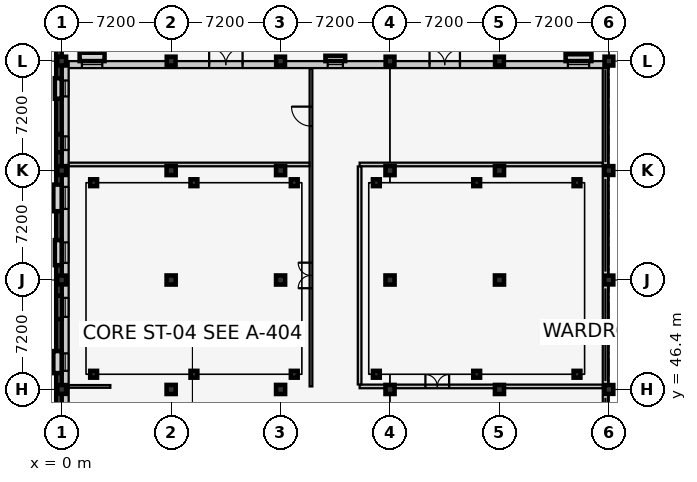
"""IFC4 building model, lengths in metres.
Left out: names, types, materials, properties, quantities, classifications, styles, units other than length and angle.
Written with IfcOpenShell. Run it as: python <this file> out.ifc"""

import sys

from ifc_helpers import new_model, si_unit, direction, frame, frame_2d, origin, origin_2d, place, context, subcontext, project, spatial, rectangle, extrude, element, fill, save


model = new_model("IFC4")
c1 = context("Model", 3, precision=1e-05, world=origin(), true_north=direction((0.0, 1.0)))
c2 = subcontext(c1, "Body", "Model", "MODEL_VIEW")
j1 = project(units=[si_unit("LENGTHUNIT", "METRE"), si_unit("PLANEANGLEUNIT", "RADIAN")], contexts=[c1])
p1 = place(None, origin())
s1 = spatial("IfcSite", under=j1, at=p1, CompositionType="ELEMENT")
p2 = place(p1, origin())
s2 = spatial("IfcBuilding", under=s1, at=p2, CompositionType="ELEMENT")
p3 = place(p2, origin())
s3 = spatial("IfcBuildingStorey", under=s2, at=p3, CompositionType="ELEMENT", Elevation=0.0)
for number, where, z_axis, x_axis in (
    (1, (0.0, 46.4, 0.0), (0.0, 0.0, 1.0), (1.0, 0.0, 0.0)),
    (2, (0.0, 53.6, 0.0), (0.0, 0.0, 1.0), (1.0, 0.0, 0.0)),
    (3, (0.0, 60.8, 0.0), (0.0, 0.0, 1.0), (1.0, 0.0, 0.0)),
    (4, (0.0, 68.0, 0.0), (0.0, 0.0, 1.0), (1.0, 0.0, 0.0)),
):
    element("IfcColumn", number, at=place(p3, frame(where, z_axis=z_axis, x_axis=x_axis)), inside=s3, PredefinedType="COLUMN", context=c2, shape_type="SweptSolid", body=[
        extrude(rectangle(XDim=0.58, YDim=0.58, at=origin_2d()), origin(), (0.0, 0.0, 1.0), 5.4),
    ])
for number, where, z_axis, x_axis in (
    (5, (7.2, 46.4, 0.0), (0.0, 0.0, 1.0), (1.0, 0.0, 0.0)),
    (6, (7.2, 53.6, 0.0), (0.0, 0.0, 1.0), (1.0, 0.0, 0.0)),
    (7, (7.2, 60.8, 0.0), (0.0, 0.0, 1.0), (1.0, 0.0, 0.0)),
):
    element("IfcColumn", number, at=place(p3, frame(where, z_axis=z_axis, x_axis=x_axis)), inside=s3, PredefinedType="COLUMN", context=c2, shape_type="SweptSolid", body=[
        extrude(rectangle(XDim=0.6, YDim=0.6, at=origin_2d()), origin(), (0.0, 0.0, 1.0), 5.4),
    ])
p4 = place(p3, frame((7.2, 68.0, 0.0), z_axis=(0.0, 0.0, 1.0), x_axis=(1.0, 0.0, 0.0)))
e8 = element("IfcColumn", 8, at=p4, inside=s3, PredefinedType="COLUMN", context=c2, shape_type="SweptSolid", body=[
    extrude(rectangle(XDim=0.58, YDim=0.58, at=origin_2d()), origin(), (0.0, 0.0, 1.0), 5.4),
])
for number, where, z_axis, x_axis in (
    (9, (14.4, 46.4, 0.0), (0.0, 0.0, 1.0), (1.0, 0.0, 0.0)),
    (10, (14.4, 53.6, 0.0), (0.0, 0.0, 1.0), (1.0, 0.0, 0.0)),
    (11, (14.4, 60.8, 0.0), (0.0, 0.0, 1.0), (1.0, 0.0, 0.0)),
):
    element("IfcColumn", number, at=place(p3, frame(where, z_axis=z_axis, x_axis=x_axis)), inside=s3, PredefinedType="COLUMN", context=c2, shape_type="SweptSolid", body=[
        extrude(rectangle(XDim=0.6, YDim=0.6, at=origin_2d()), origin(), (0.0, 0.0, 1.0), 5.4),
    ])
p5 = place(p3, frame((14.4, 68.0, 0.0), z_axis=(0.0, 0.0, 1.0), x_axis=(1.0, 0.0, 0.0)))
e12 = element("IfcColumn", 12, at=p5, inside=s3, PredefinedType="COLUMN", context=c2, shape_type="SweptSolid", body=[
    extrude(rectangle(XDim=0.58, YDim=0.58, at=origin_2d()), origin(), (0.0, 0.0, 1.0), 5.4),
])
for number, where, z_axis, x_axis in (
    (13, (21.6, 46.4, 0.0), (0.0, 0.0, 1.0), (1.0, 0.0, 0.0)),
    (14, (21.6, 53.6, 0.0), (0.0, 0.0, 1.0), (1.0, 0.0, 0.0)),
    (15, (21.6, 60.8, 0.0), (0.0, 0.0, 1.0), (1.0, 0.0, 0.0)),
):
    element("IfcColumn", number, at=place(p3, frame(where, z_axis=z_axis, x_axis=x_axis)), inside=s3, PredefinedType="COLUMN", context=c2, shape_type="SweptSolid", body=[
        extrude(rectangle(XDim=0.6, YDim=0.6, at=origin_2d()), origin(), (0.0, 0.0, 1.0), 5.4),
    ])
p6 = place(p3, frame((21.6, 68.0, 0.0), z_axis=(0.0, 0.0, 1.0), x_axis=(1.0, 0.0, 0.0)))
e16 = element("IfcColumn", 16, at=p6, inside=s3, PredefinedType="COLUMN", context=c2, shape_type="SweptSolid", body=[
    extrude(rectangle(XDim=0.58, YDim=0.58, at=origin_2d()), origin(), (0.0, 0.0, 1.0), 5.4),
])
for number, where, z_axis, x_axis in (
    (17, (28.8, 46.4, 0.0), (0.0, 0.0, 1.0), (1.0, 0.0, 0.0)),
    (18, (28.8, 53.6, 0.0), (0.0, 0.0, 1.0), (1.0, 0.0, 0.0)),
    (19, (28.8, 60.8, 0.0), (0.0, 0.0, 1.0), (1.0, 0.0, 0.0)),
):
    element("IfcColumn", number, at=place(p3, frame(where, z_axis=z_axis, x_axis=x_axis)), inside=s3, PredefinedType="COLUMN", context=c2, shape_type="SweptSolid", body=[
        extrude(rectangle(XDim=0.6, YDim=0.6, at=origin_2d()), origin(), (0.0, 0.0, 1.0), 5.4),
    ])
for number, where, z_axis, x_axis in (
    (20, (28.8, 68.0, 0.0), (0.0, 0.0, 1.0), (1.0, 0.0, 0.0)),
    (21, (36.0, 46.4, 0.0), (0.0, 0.0, 1.0), (1.0, 0.0, 0.0)),
    (22, (36.0, 53.6, 0.0), (0.0, 0.0, 1.0), (1.0, 0.0, 0.0)),
    (23, (36.0, 60.8, 0.0), (0.0, 0.0, 1.0), (1.0, 0.0, 0.0)),
    (24, (36.0, 68.0, 0.0), (0.0, 0.0, 1.0), (1.0, 0.0, 0.0)),
):
    element("IfcColumn", number, at=place(p3, frame(where, z_axis=z_axis, x_axis=x_axis)), inside=s3, PredefinedType="COLUMN", context=c2, shape_type="SweptSolid", body=[
        extrude(rectangle(XDim=0.58, YDim=0.58, at=origin_2d()), origin(), (0.0, 0.0, 1.0), 5.4),
    ])
p7 = place(p3, frame((2.1, 47.4, -0.55), z_axis=(0.0, 0.0, 1.0), x_axis=(1.0, 0.0, 0.0)))
e25 = element("IfcColumn", 25, at=p7, inside=s3, PredefinedType="COLUMN", context=c2, shape_type="SweptSolid", body=[
    extrude(rectangle(XDim=0.45, YDim=0.45, at=origin_2d()), origin(), (0.0, 0.0, 1.0), 0.955),
])
p8 = place(p3, frame((2.1, 60.0, -0.55), z_axis=(0.0, 0.0, 1.0), x_axis=(1.0, 0.0, 0.0)))
e26 = element("IfcColumn", 26, at=p8, inside=s3, PredefinedType="COLUMN", context=c2, shape_type="SweptSolid", body=[
    extrude(rectangle(XDim=0.45, YDim=0.45, at=origin_2d()), origin(), (0.0, 0.0, 1.0), 3.625),
])
p9 = place(p3, frame((8.7, 47.4, -0.55), z_axis=(0.0, 0.0, 1.0), x_axis=(1.0, 0.0, 0.0)))
e27 = element("IfcColumn", 27, at=p9, inside=s3, PredefinedType="COLUMN", context=c2, shape_type="SweptSolid", body=[
    extrude(rectangle(XDim=0.45, YDim=0.45, at=origin_2d()), origin(), (0.0, 0.0, 1.0), 0.955),
])
p10 = place(p3, frame((8.7, 60.0, -0.55), z_axis=(0.0, 0.0, 1.0), x_axis=(1.0, 0.0, 0.0)))
e28 = element("IfcColumn", 28, at=p10, inside=s3, PredefinedType="COLUMN", context=c2, shape_type="SweptSolid", body=[
    extrude(rectangle(XDim=0.45, YDim=0.45, at=origin_2d()), origin(), (0.0, 0.0, 1.0), 3.625),
])
p11 = place(p3, frame((15.3, 47.4, -0.55), z_axis=(0.0, 0.0, 1.0), x_axis=(1.0, 0.0, 0.0)))
e29 = element("IfcColumn", 29, at=p11, inside=s3, PredefinedType="COLUMN", context=c2, shape_type="SweptSolid", body=[
    extrude(rectangle(XDim=0.45, YDim=0.45, at=origin_2d()), origin(), (0.0, 0.0, 1.0), 0.955),
])
p12 = place(p3, frame((15.3, 60.0, -0.55), z_axis=(0.0, 0.0, 1.0), x_axis=(1.0, 0.0, 0.0)))
e30 = element("IfcColumn", 30, at=p12, inside=s3, PredefinedType="COLUMN", context=c2, shape_type="SweptSolid", body=[
    extrude(rectangle(XDim=0.45, YDim=0.45, at=origin_2d()), origin(), (0.0, 0.0, 1.0), 3.625),
])
p13 = place(p3, frame((20.7, 47.4, -0.55), z_axis=(0.0, 0.0, 1.0), x_axis=(1.0, 0.0, 0.0)))
e31 = element("IfcColumn", 31, at=p13, inside=s3, PredefinedType="COLUMN", context=c2, shape_type="SweptSolid", body=[
    extrude(rectangle(XDim=0.45, YDim=0.45, at=origin_2d()), origin(), (0.0, 0.0, 1.0), 0.975),
])
p14 = place(p3, frame((20.7, 60.0, -0.55), z_axis=(0.0, 0.0, 1.0), x_axis=(1.0, 0.0, 0.0)))
e32 = element("IfcColumn", 32, at=p14, inside=s3, PredefinedType="COLUMN", context=c2, shape_type="SweptSolid", body=[
    extrude(rectangle(XDim=0.45, YDim=0.45, at=origin_2d()), origin(), (0.0, 0.0, 1.0), 3.645),
])
p15 = place(p3, frame((27.3, 47.4, -0.55), z_axis=(0.0, 0.0, 1.0), x_axis=(1.0, 0.0, 0.0)))
e33 = element("IfcColumn", 33, at=p15, inside=s3, PredefinedType="COLUMN", context=c2, shape_type="SweptSolid", body=[
    extrude(rectangle(XDim=0.45, YDim=0.45, at=origin_2d()), origin(), (0.0, 0.0, 1.0), 0.975),
])
p16 = place(p3, frame((27.3, 60.0, -0.55), z_axis=(0.0, 0.0, 1.0), x_axis=(1.0, 0.0, 0.0)))
e34 = element("IfcColumn", 34, at=p16, inside=s3, PredefinedType="COLUMN", context=c2, shape_type="SweptSolid", body=[
    extrude(rectangle(XDim=0.45, YDim=0.45, at=origin_2d()), origin(), (0.0, 0.0, 1.0), 3.645),
])
p17 = place(p3, frame((33.9, 47.4, -0.55), z_axis=(0.0, 0.0, 1.0), x_axis=(1.0, 0.0, 0.0)))
e35 = element("IfcColumn", 35, at=p17, inside=s3, PredefinedType="COLUMN", context=c2, shape_type="SweptSolid", body=[
    extrude(rectangle(XDim=0.45, YDim=0.45, at=origin_2d()), origin(), (0.0, 0.0, 1.0), 0.975),
])
p18 = place(p3, frame((33.9, 60.0, -0.55), z_axis=(0.0, 0.0, 1.0), x_axis=(1.0, 0.0, 0.0)))
e36 = element("IfcColumn", 36, at=p18, inside=s3, PredefinedType="COLUMN", context=c2, shape_type="SweptSolid", body=[
    extrude(rectangle(XDim=0.45, YDim=0.45, at=origin_2d()), origin(), (0.0, 0.0, 1.0), 3.645),
])
p19 = place(p3, frame((35.77, 68.0, 0.0), z_axis=(0.0, 0.0, 1.0), x_axis=(0.0, -1.0, 0.0)))
e37 = element("IfcWall", 37, at=p19, inside=s3, PredefinedType="SOLIDWALL", context=c2, shape_type="SweptSolid", body=[
    extrude(rectangle(XDim=28.8, YDim=0.35, at=frame_2d((14.4, 0.0))), origin(), (0.0, 0.0, 1.0), 0.85),
])
p20 = place(p3, frame((0.0, 67.77, 0.0), z_axis=(0.0, 0.0, 1.0), x_axis=(1.0, 0.0, 0.0)))
e38 = element("IfcWall", 38, at=p20, inside=s3, PredefinedType="SOLIDWALL", context=c2, shape_type="SweptSolid", body=[
    extrude(rectangle(XDim=36.0, YDim=0.46, at=frame_2d((18.0, 0.0))), origin(), (0.0, 0.0, 1.0), 4.435),
])
p21 = place(p20, frame((9.7, 0.0, 0.0)))
e39 = element("IfcOpeningElement", 39, at=p21, cuts=e38, PredefinedType="OPENING", context=c2, shape_type="SweptSolid", body=[
    extrude(rectangle(XDim=2.2, YDim=2.4, at=frame_2d((1.1, 1.2))), frame((0.0, 0.242, 0.0), z_axis=(0.0, -1.0, 0.0), x_axis=(1.0, 0.0, 0.0)), (0.0, 0.0, 1.0), 0.484),
])
p22 = place(p20, frame((24.2, 0.0, 0.0)))
e40 = element("IfcOpeningElement", 40, at=p22, cuts=e38, PredefinedType="OPENING", context=c2, shape_type="SweptSolid", body=[
    extrude(rectangle(XDim=2.0, YDim=2.35, at=frame_2d((1.0, 1.175))), frame((0.0, 0.242, 0.0), z_axis=(0.0, -1.0, 0.0), x_axis=(1.0, 0.0, 0.0)), (0.0, 0.0, 1.0), 0.484),
])
p23 = place(p20, frame((1.33, 0.0, 0.9)))
e41 = element("IfcOpeningElement", 41, at=p23, cuts=e38, PredefinedType="OPENING", context=c2, shape_type="SweptSolid", body=[
    extrude(rectangle(XDim=1.34, YDim=1.75, at=frame_2d((0.67, 0.875))), frame((0.0, 0.242, 0.0), z_axis=(0.0, -1.0, 0.0), x_axis=(1.0, 0.0, 0.0)), (0.0, 0.0, 1.0), 0.484),
])
p24 = place(p20, frame((17.5, 0.0, 0.9)))
e42 = element("IfcOpeningElement", 42, at=p24, cuts=e38, PredefinedType="OPENING", context=c2, shape_type="SweptSolid", body=[
    extrude(rectangle(XDim=1.0, YDim=1.35, at=frame_2d((0.5, 0.675))), frame((0.0, 0.242, 0.0), z_axis=(0.0, -1.0, 0.0), x_axis=(1.0, 0.0, 0.0)), (0.0, 0.0, 1.0), 0.484),
])
p25 = place(p20, frame((33.3, 0.0, 0.9)))
e43 = element("IfcOpeningElement", 43, at=p25, cuts=e38, PredefinedType="OPENING", context=c2, shape_type="SweptSolid", body=[
    extrude(rectangle(XDim=1.4, YDim=1.35, at=frame_2d((0.7, 0.675))), frame((0.0, 0.242, 0.0), z_axis=(0.0, -1.0, 0.0), x_axis=(1.0, 0.0, 0.0)), (0.0, 0.0, 1.0), 0.484),
])
p26 = place(p3, frame((0.23, 39.2, 0.0), z_axis=(0.0, 0.0, 1.0), x_axis=(0.0, 1.0, 0.0)))
e44 = element("IfcWall", 44, at=p26, inside=s3, PredefinedType="SOLIDWALL", context=c2, shape_type="SweptSolid", body=[
    extrude(rectangle(XDim=28.8, YDim=0.46, at=frame_2d((14.4, 0.0))), origin(), (0.0, 0.0, 1.0), 4.535),
])
p27 = place(p26, frame((2.7, 0.0, 0.0)))
e45 = element("IfcOpeningElement", 45, at=p27, cuts=e44, PredefinedType="OPENING", context=c2, shape_type="SweptSolid", body=[
    extrude(rectangle(XDim=1.8, YDim=2.3, at=frame_2d((0.9, 1.15))), frame((0.0, 0.242, 0.0), z_axis=(0.0, -1.0, 0.0), x_axis=(1.0, 0.0, 0.0)), (0.0, 0.0, 1.0), 0.484),
])
p28 = place(p26, frame((8.425, 0.0, 0.9)))
e46 = element("IfcOpeningElement", 46, at=p28, cuts=e44, PredefinedType="OPENING", context=c2, shape_type="SweptSolid", body=[
    extrude(rectangle(XDim=1.15, YDim=1.45, at=frame_2d((0.575, 0.725))), frame((0.0, 0.242, 0.0), z_axis=(0.0, -1.0, 0.0), x_axis=(1.0, 0.0, 0.0)), (0.0, 0.0, 1.0), 0.484),
])
p29 = place(p26, frame((11.975, 0.0, 0.9)))
e47 = element("IfcOpeningElement", 47, at=p29, cuts=e44, PredefinedType="OPENING", context=c2, shape_type="SweptSolid", body=[
    extrude(rectangle(XDim=1.25, YDim=1.45, at=frame_2d((0.625, 0.725))), frame((0.0, 0.242, 0.0), z_axis=(0.0, -1.0, 0.0), x_axis=(1.0, 0.0, 0.0)), (0.0, 0.0, 1.0), 0.484),
])
p30 = place(p26, frame((15.525, 0.0, 0.9)))
e48 = element("IfcOpeningElement", 48, at=p30, cuts=e44, PredefinedType="OPENING", context=c2, shape_type="SweptSolid", body=[
    extrude(rectangle(XDim=1.35, YDim=1.45, at=frame_2d((0.675, 0.725))), frame((0.0, 0.242, 0.0), z_axis=(0.0, -1.0, 0.0), x_axis=(1.0, 0.0, 0.0)), (0.0, 0.0, 1.0), 0.484),
])
p31 = place(p26, frame((19.075, 0.0, 0.9)))
e49 = element("IfcOpeningElement", 49, at=p31, cuts=e44, PredefinedType="OPENING", context=c2, shape_type="SweptSolid", body=[
    extrude(rectangle(XDim=1.45, YDim=1.45, at=frame_2d((0.725, 0.725))), frame((0.0, 0.242, 0.0), z_axis=(0.0, -1.0, 0.0), x_axis=(1.0, 0.0, 0.0)), (0.0, 0.0, 1.0), 0.484),
])
p32 = place(p26, frame((22.95, 0.0, 0.9)))
e50 = element("IfcOpeningElement", 50, at=p32, cuts=e44, PredefinedType="OPENING", context=c2, shape_type="SweptSolid", body=[
    extrude(rectangle(XDim=0.9, YDim=1.6, at=frame_2d((0.45, 0.8))), frame((0.0, 0.242, 0.0), z_axis=(0.0, -1.0, 0.0), x_axis=(1.0, 0.0, 0.0)), (0.0, 0.0, 1.0), 0.484),
])
p33 = place(p26, frame((26.475, 0.0, 0.9)))
e51 = element("IfcOpeningElement", 51, at=p33, cuts=e44, PredefinedType="OPENING", context=c2, shape_type="SweptSolid", body=[
    extrude(rectangle(XDim=1.05, YDim=1.6, at=frame_2d((0.525, 0.8))), frame((0.0, 0.242, 0.0), z_axis=(0.0, -1.0, 0.0), x_axis=(1.0, 0.0, 0.0)), (0.0, 0.0, 1.0), 0.484),
])
p34 = place(p3, frame((-0.18, 39.4, -0.8), z_axis=(0.0, 0.0, 1.0), x_axis=(0.0, 1.0, 0.0)))
e52 = element("IfcWall", 52, at=p34, inside=s3, PredefinedType="USERDEFINED", context=c2, shape_type="SweptSolid", body=[
    extrude(rectangle(XDim=28.6, YDim=0.36, at=frame_2d((14.3, 0.0))), origin(), (0.0, 0.0, 1.0), 1.3),
])
p35 = place(p3, frame((-0.18, 68.0, -0.8), z_axis=(0.0, 0.0, 1.0), x_axis=(0.0, 1.0, 0.0)))
e53 = element("IfcWall", 53, at=p35, inside=s3, PredefinedType="USERDEFINED", context=c2, shape_type="SweptSolid", body=[
    extrude(rectangle(XDim=43.8, YDim=0.36, at=frame_2d((21.9, 0.0))), origin(), (0.0, 0.0, 1.0), 1.3),
])
p36 = place(p3, frame((0.47, 46.6, 0.0), z_axis=(0.0, 0.0, 1.0), x_axis=(1.0, 0.0, 0.0)))
e54 = element("IfcWall", 54, at=p36, inside=s3, PredefinedType="PARTITIONING", context=c2, shape_type="SweptSolid", body=[
    extrude(rectangle(XDim=2.73, YDim=0.18, at=frame_2d((1.365, 0.0))), origin(), (0.0, 0.0, 1.0), 4.465),
])
p37 = place(p3, frame((16.4, 46.6, 0.0), z_axis=(0.0, 0.0, 1.0), x_axis=(0.0, 1.0, 0.0)))
e55 = element("IfcWall", 55, at=p37, inside=s3, PredefinedType="PARTITIONING", context=c2, shape_type="SweptSolid", body=[
    extrude(rectangle(XDim=20.93, YDim=0.18, at=frame_2d((10.465, 0.0))), origin(), (0.0, 0.0, 1.0), 5.14),
])
p38 = place(p37, frame((6.46, 0.0, 0.0)))
e56 = element("IfcOpeningElement", 56, at=p38, cuts=e55, PredefinedType="OPENING", context=c2, shape_type="SweptSolid", body=[
    extrude(rectangle(XDim=1.68, YDim=2.3, at=frame_2d((0.84, 1.15))), frame((0.0, 0.102, 0.0), z_axis=(0.0, -1.0, 0.0), x_axis=(1.0, 0.0, 0.0)), (0.0, 0.0, 1.0), 0.204),
])
p39 = place(p37, frame((17.125, 0.0, 0.0)))
e57 = element("IfcOpeningElement", 57, at=p39, cuts=e55, PredefinedType="OPENING", context=c2, shape_type="SweptSolid", body=[
    extrude(rectangle(XDim=1.28, YDim=2.2, at=frame_2d((0.64, 1.1))), frame((0.0, 0.102, 0.0), z_axis=(0.0, -1.0, 0.0), x_axis=(1.0, 0.0, 0.0)), (0.0, 0.0, 1.0), 0.204),
])
p40 = place(p3, frame((0.47, 61.2, 0.0), z_axis=(0.0, 0.0, 1.0), x_axis=(1.0, 0.0, 0.0)))
e58 = element("IfcWall", 58, at=p40, inside=s3, PredefinedType="PARTITIONING", context=c2, shape_type="SweptSolid", body=[
    extrude(rectangle(XDim=15.83, YDim=0.24, at=frame_2d((7.915, 0.0))), origin(), (0.0, 0.0, 1.0), 5.14),
])
p41 = place(p3, frame((19.6, 46.6, 0.0), z_axis=(0.0, 0.0, 1.0), x_axis=(1.0, 0.0, 0.0)))
e59 = element("IfcWall", 59, at=p41, inside=s3, PredefinedType="PARTITIONING", context=c2, shape_type="SweptSolid", body=[
    extrude(rectangle(XDim=15.985, YDim=0.24, at=frame_2d((7.992, 0.0))), origin(), (0.0, 0.0, 1.0), 4.265),
])
p42 = place(p41, frame((4.327, 0.0, 0.0)))
e60 = element("IfcOpeningElement", 60, at=p42, cuts=e59, PredefinedType="OPENING", context=c2, shape_type="SweptSolid", body=[
    extrude(rectangle(XDim=1.56, YDim=2.25, at=frame_2d((0.78, 1.125))), frame((0.0, 0.132, 0.0), z_axis=(0.0, -1.0, 0.0), x_axis=(1.0, 0.0, 0.0)), (0.0, 0.0, 1.0), 0.264),
])
p43 = place(p3, frame((19.6, 61.2, 0.0), z_axis=(0.0, 0.0, 1.0), x_axis=(1.0, 0.0, 0.0)))
e61 = element("IfcWall", 61, at=p43, inside=s3, PredefinedType="PARTITIONING", context=c2, shape_type="SweptSolid", body=[
    extrude(rectangle(XDim=15.985, YDim=0.24, at=frame_2d((7.992, 0.0))), origin(), (0.0, 0.0, 1.0), 4.265),
])
p44 = place(p3, frame((19.6, 46.73, 0.0), z_axis=(0.0, 0.0, 1.0), x_axis=(0.0, 1.0, 0.0)))
e62 = element("IfcWall", 62, at=p44, inside=s3, PredefinedType="PARTITIONING", context=c2, shape_type="SweptSolid", body=[
    extrude(rectangle(XDim=14.34, YDim=0.24, at=frame_2d((7.17, 0.0))), origin(), (0.0, 0.0, 1.0), 5.14),
])
p45 = place(p21, origin())
e63 = element("IfcDoor", 63, at=p45, inside=s3, OperationType="DOUBLE_DOOR_SINGLE_SWING", PredefinedType="DOOR", context=c2, shape_type="SweptSolid", body=[
    extrude(rectangle(XDim=2.2, YDim=2.4, at=frame_2d((1.1, 1.2))), frame((0.0, 0.025, 0.0), z_axis=(0.0, -1.0, 0.0), x_axis=(1.0, 0.0, 0.0)), (0.0, 0.0, 1.0), 0.05),
])
fill(e39, e63)
p46 = place(p22, origin())
e64 = element("IfcDoor", 64, at=p46, inside=s3, OperationType="DOUBLE_DOOR_SINGLE_SWING", PredefinedType="DOOR", context=c2, shape_type="SweptSolid", body=[
    extrude(rectangle(XDim=2.0, YDim=2.35, at=frame_2d((1.0, 1.175))), frame((0.0, 0.025, 0.0), z_axis=(0.0, -1.0, 0.0), x_axis=(1.0, 0.0, 0.0)), (0.0, 0.0, 1.0), 0.05),
])
fill(e40, e64)
p47 = place(p23, origin())
e65 = element("IfcWindow", 65, at=p47, inside=s3, PartitioningType="SINGLE_PANEL", PredefinedType="WINDOW", context=c2, shape_type="SweptSolid", body=[
    extrude(rectangle(XDim=1.34, YDim=1.75, at=frame_2d((0.67, 0.875))), frame((0.0, 0.03, 0.0), z_axis=(0.0, -1.0, 0.0), x_axis=(1.0, 0.0, 0.0)), (0.0, 0.0, 1.0), 0.06),
])
fill(e41, e65)
p48 = place(p24, origin())
e66 = element("IfcWindow", 66, at=p48, inside=s3, PartitioningType="SINGLE_PANEL", PredefinedType="WINDOW", context=c2, shape_type="SweptSolid", body=[
    extrude(rectangle(XDim=1.0, YDim=1.35, at=frame_2d((0.5, 0.675))), frame((0.0, 0.03, 0.0), z_axis=(0.0, -1.0, 0.0), x_axis=(1.0, 0.0, 0.0)), (0.0, 0.0, 1.0), 0.06),
])
fill(e42, e66)
p49 = place(p25, origin())
e67 = element("IfcWindow", 67, at=p49, inside=s3, PartitioningType="SINGLE_PANEL", PredefinedType="WINDOW", context=c2, shape_type="SweptSolid", body=[
    extrude(rectangle(XDim=1.4, YDim=1.35, at=frame_2d((0.7, 0.675))), frame((0.0, 0.03, 0.0), z_axis=(0.0, -1.0, 0.0), x_axis=(1.0, 0.0, 0.0)), (0.0, 0.0, 1.0), 0.06),
])
fill(e43, e67)
p50 = place(p28, origin())
e68 = element("IfcWindow", 68, at=p50, inside=s3, PartitioningType="SINGLE_PANEL", PredefinedType="WINDOW", context=c2, shape_type="SweptSolid", body=[
    extrude(rectangle(XDim=1.15, YDim=1.45, at=frame_2d((0.575, 0.725))), frame((0.0, 0.03, 0.0), z_axis=(0.0, -1.0, 0.0), x_axis=(1.0, 0.0, 0.0)), (0.0, 0.0, 1.0), 0.06),
])
fill(e46, e68)
p51 = place(p29, origin())
e69 = element("IfcWindow", 69, at=p51, inside=s3, PartitioningType="SINGLE_PANEL", PredefinedType="WINDOW", context=c2, shape_type="SweptSolid", body=[
    extrude(rectangle(XDim=1.25, YDim=1.45, at=frame_2d((0.625, 0.725))), frame((0.0, 0.03, 0.0), z_axis=(0.0, -1.0, 0.0), x_axis=(1.0, 0.0, 0.0)), (0.0, 0.0, 1.0), 0.06),
])
fill(e47, e69)
p52 = place(p30, origin())
e70 = element("IfcWindow", 70, at=p52, inside=s3, PartitioningType="SINGLE_PANEL", PredefinedType="WINDOW", context=c2, shape_type="SweptSolid", body=[
    extrude(rectangle(XDim=1.35, YDim=1.45, at=frame_2d((0.675, 0.725))), frame((0.0, 0.03, 0.0), z_axis=(0.0, -1.0, 0.0), x_axis=(1.0, 0.0, 0.0)), (0.0, 0.0, 1.0), 0.06),
])
fill(e48, e70)
p53 = place(p31, origin())
e71 = element("IfcWindow", 71, at=p53, inside=s3, PartitioningType="SINGLE_PANEL", PredefinedType="WINDOW", context=c2, shape_type="SweptSolid", body=[
    extrude(rectangle(XDim=1.45, YDim=1.45, at=frame_2d((0.725, 0.725))), frame((0.0, 0.03, 0.0), z_axis=(0.0, -1.0, 0.0), x_axis=(1.0, 0.0, 0.0)), (0.0, 0.0, 1.0), 0.06),
])
fill(e49, e71)
p54 = place(p32, origin())
e72 = element("IfcWindow", 72, at=p54, inside=s3, PartitioningType="SINGLE_PANEL", PredefinedType="WINDOW", context=c2, shape_type="SweptSolid", body=[
    extrude(rectangle(XDim=0.9, YDim=1.6, at=frame_2d((0.45, 0.8))), frame((0.0, 0.03, 0.0), z_axis=(0.0, -1.0, 0.0), x_axis=(1.0, 0.0, 0.0)), (0.0, 0.0, 1.0), 0.06),
])
fill(e50, e72)
p55 = place(p33, origin())
e73 = element("IfcWindow", 73, at=p55, inside=s3, PartitioningType="SINGLE_PANEL", PredefinedType="WINDOW", context=c2, shape_type="SweptSolid", body=[
    extrude(rectangle(XDim=1.05, YDim=1.6, at=frame_2d((0.525, 0.8))), frame((0.0, 0.03, 0.0), z_axis=(0.0, -1.0, 0.0), x_axis=(1.0, 0.0, 0.0)), (0.0, 0.0, 1.0), 0.06),
])
fill(e51, e73)
p56 = place(p38, origin())
e74 = element("IfcDoor", 74, at=p56, inside=s3, OperationType="DOUBLE_DOOR_SINGLE_SWING", PredefinedType="DOOR", context=c2, shape_type="SweptSolid", body=[
    extrude(rectangle(XDim=1.68, YDim=2.3, at=frame_2d((0.84, 1.15))), frame((0.0, 0.025, 0.0), z_axis=(0.0, -1.0, 0.0), x_axis=(1.0, 0.0, 0.0)), (0.0, 0.0, 1.0), 0.05),
])
fill(e56, e74)
p57 = place(p42, origin())
e75 = element("IfcDoor", 75, at=p57, inside=s3, OperationType="DOUBLE_DOOR_SINGLE_SWING", PredefinedType="DOOR", context=c2, shape_type="SweptSolid", body=[
    extrude(rectangle(XDim=1.56, YDim=2.25, at=frame_2d((0.78, 1.125))), frame((0.0, 0.025, 0.0), z_axis=(0.0, -1.0, 0.0), x_axis=(1.0, 0.0, 0.0)), (0.0, 0.0, 1.0), 0.05),
])
fill(e60, e75)
p58 = place(p39, origin())
e76 = element("IfcDoor", 76, at=p58, inside=s3, OperationType="SINGLE_SWING_RIGHT", PredefinedType="DOOR", context=c2, shape_type="SweptSolid", body=[
    extrude(rectangle(XDim=1.28, YDim=2.2, at=frame_2d((0.64, 1.1))), frame((0.0, 0.025, 0.0), z_axis=(0.0, -1.0, 0.0), x_axis=(1.0, 0.0, 0.0)), (0.0, 0.0, 1.0), 0.05),
])
fill(e57, e76)
save(model, sys.argv[1])
